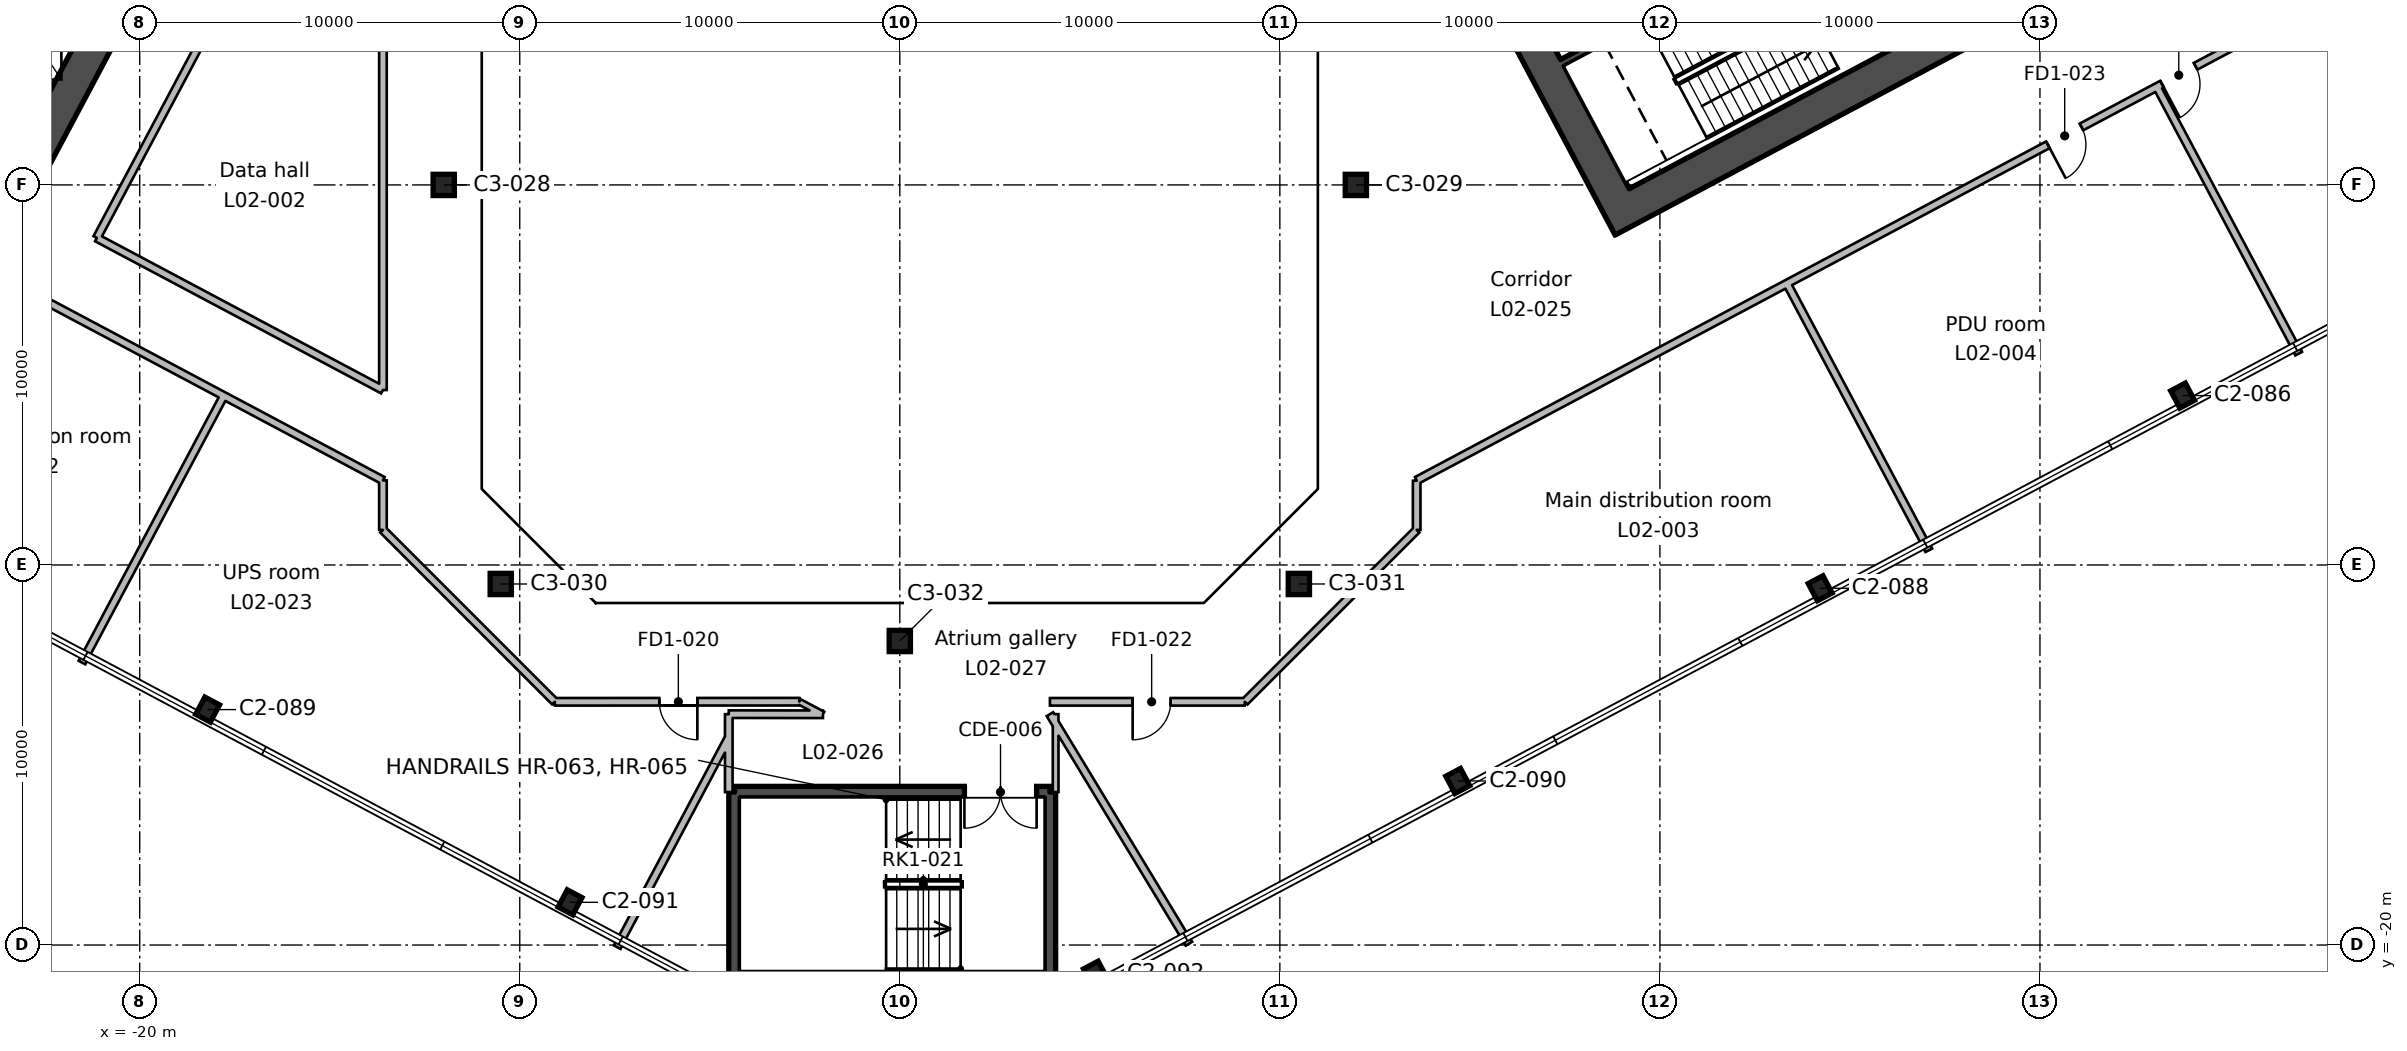
"""IFC4 building model, lengths in metres.
Left out: names, types, materials, properties, quantities, classifications, styles, units other than length and angle.
Written with IfcOpenShell. Run it as: python <this file> out.ifc"""

import sys

from ifc_helpers import new_model, si_unit, direction, frame, frame_2d, origin, origin_2d, place, context, subcontext, project, spatial, rectangle, hollow_rectangle, i_section, extrude, element, fill, save


model = new_model("IFC4")
c1 = context("Model", 3, precision=1e-05, world=origin(), true_north=direction((0.0, 1.0)))
c2 = subcontext(c1, "Body", "Model", "MODEL_VIEW")
j1 = project(units=[si_unit("LENGTHUNIT", "METRE"), si_unit("PLANEANGLEUNIT", "RADIAN")], contexts=[c1])
p1 = place(None, origin())
s1 = spatial("IfcSite", under=j1, at=p1, CompositionType="ELEMENT")
p2 = place(p1, origin())
s2 = spatial("IfcBuilding", under=s1, at=p2, CompositionType="ELEMENT")
p3 = place(p2, frame((0.0, 0.0, 12.2)))
s3 = spatial("IfcBuildingStorey", under=s2, at=p3, CompositionType="ELEMENT", Elevation=12.2)
for number, where, z_axis, x_axis in (
    (1, (5.146, -20.754, 0.0), (0.0, 0.0, 1.0), (0.883, 0.469, 0.0)),
    (2, (-8.677, -18.876, 0.0), (0.0, 0.0, 1.0), (0.883, -0.469, 0.0)),
    (3, (14.681, -15.683, 0.0), (0.0, 0.0, 1.0), (0.883, 0.469, 0.0)),
    (4, (-18.213, -13.805, 0.0), (0.0, 0.0, 1.0), (0.883, -0.469, 0.0)),
):
    element("IfcColumn", number, at=place(p3, frame(where, z_axis=z_axis, x_axis=x_axis)), inside=s3, PredefinedType="COLUMN", context=c2, shape_type="SweptSolid", body=[
        extrude(i_section(OverallWidth=0.437, OverallDepth=0.513, WebThickness=0.061, FlangeThickness=0.097, FilletRadius=0.015, at=origin_2d()), origin(), (0.0, 0.0, 1.0), 5.4),
    ])
p4 = place(p3, frame((0.0, -12.0, 0.0), z_axis=(0.0, 0.0, 1.0), x_axis=(1.0, 0.0, 0.0)))
e5 = element("IfcColumn", 5, at=p4, inside=s3, PredefinedType="COLUMN", context=c2, shape_type="SweptSolid", body=[
    extrude(hollow_rectangle(XDim=0.559, YDim=0.559, WallThickness=0.024, InnerFilletRadius=0.012, OuterFilletRadius=0.035, at=origin_2d()), origin(), (0.0, 0.0, 1.0), 5.4),
])
p5 = place(p3, frame((24.217, -10.613, 0.0), z_axis=(0.0, 0.0, 1.0), x_axis=(0.882947592859, 0.469471562786, 0.0)))
e6 = element("IfcColumn", 6, at=p5, inside=s3, PredefinedType="COLUMN", context=c2, shape_type="SweptSolid", body=[
    extrude(i_section(OverallWidth=0.437, OverallDepth=0.513, WebThickness=0.061, FlangeThickness=0.097, FilletRadius=0.015, at=origin_2d()), origin(), (0.0, 0.0, 1.0), 5.4),
])
for number, where, z_axis, x_axis in (
    (7, (-10.5, -10.5, 0.0), (0.0, 0.0, 1.0), (1.0, 0.0, 0.0)),
    (8, (10.5, -10.5, 0.0), (0.0, 0.0, 1.0), (1.0, 0.0, 0.0)),
):
    element("IfcColumn", number, at=place(p3, frame(where, z_axis=z_axis, x_axis=x_axis)), inside=s3, PredefinedType="COLUMN", context=c2, shape_type="SweptSolid", body=[
        extrude(hollow_rectangle(XDim=0.559, YDim=0.559, WallThickness=0.024, InnerFilletRadius=0.012, OuterFilletRadius=0.035, at=origin_2d()), origin(), (0.0, 0.0, 1.0), 5.4),
    ])
p6 = place(p3, frame((33.753, -5.543, 0.0), z_axis=(0.0, 0.0, 1.0), x_axis=(0.882947592859, 0.469471562786, 0.0)))
e9 = element("IfcColumn", 9, at=p6, inside=s3, PredefinedType="COLUMN", context=c2, shape_type="SweptSolid", body=[
    extrude(i_section(OverallWidth=0.437, OverallDepth=0.513, WebThickness=0.061, FlangeThickness=0.097, FilletRadius=0.015, at=origin_2d()), origin(), (0.0, 0.0, 1.0), 5.4),
])
for number, where, z_axis, x_axis in (
    (10, (-12.0, 0.0, 0.0), (0.0, 0.0, 1.0), (1.0, 0.0, 0.0)),
    (11, (12.0, 0.0, 0.0), (0.0, 0.0, 1.0), (1.0, 0.0, 0.0)),
):
    element("IfcColumn", number, at=place(p3, frame(where, z_axis=z_axis, x_axis=x_axis)), inside=s3, PredefinedType="COLUMN", context=c2, shape_type="SweptSolid", body=[
        extrude(hollow_rectangle(XDim=0.559, YDim=0.559, WallThickness=0.024, InnerFilletRadius=0.012, OuterFilletRadius=0.035, at=origin_2d()), origin(), (0.0, 0.0, 1.0), 5.4),
    ])
p7 = place(p3, frame((-13.362, 18.43, 0.0), z_axis=(0.0, 0.0, 1.0), x_axis=(-0.46947084998, -0.882947971864, 0.0)))
e12 = element("IfcWall", 12, at=p7, inside=s3, PredefinedType="SHEAR", context=c2, shape_type="SweptSolid", body=[
    extrude(rectangle(XDim=20.0, YDim=0.9, at=frame_2d((10.0, 0.0))), origin(), (0.0, 0.0, 1.0), 5.4),
])
p8 = place(p7, frame((7.0, 0.0, 0.0)))
e13 = element("IfcOpeningElement", 13, at=p8, cuts=e12, PredefinedType="OPENING", context=c2, shape_type="SweptSolid", body=[
    extrude(rectangle(XDim=2.4, YDim=2.4, at=frame_2d((1.2, 1.2))), frame((0.0, 0.46, 0.0), z_axis=(0.0, -1.0, 0.0), x_axis=(1.0, 0.0, 0.0)), (0.0, 0.0, 1.0), 0.92),
])
p9 = place(p3, frame((19.219, -1.107, 0.0), z_axis=(0.0, 0.0, 1.0), x_axis=(-0.46947084998, 0.882947971864, 0.0)))
e14 = element("IfcWall", 14, at=p9, inside=s3, PredefinedType="SHEAR", context=c2, shape_type="SweptSolid", body=[
    extrude(rectangle(XDim=20.0, YDim=0.9, at=frame_2d((10.0, 0.0))), origin(), (0.0, 0.0, 1.0), 5.4),
])
p10 = place(p9, frame((7.0, 0.0, 0.0)))
e15 = element("IfcOpeningElement", 15, at=p10, cuts=e14, PredefinedType="OPENING", context=c2, shape_type="SweptSolid", body=[
    extrude(rectangle(XDim=2.4, YDim=2.4, at=frame_2d((1.2, 1.2))), frame((0.0, 0.46, 0.0), z_axis=(0.0, -1.0, 0.0), x_axis=(1.0, 0.0, 0.0)), (0.0, 0.0, 1.0), 0.92),
])
p11 = place(p3, frame((19.405, -0.498, 0.0), z_axis=(0.0, 0.0, 1.0), x_axis=(0.88294509198, 0.469476266226, 0.0)))
e16 = element("IfcWall", 16, at=p11, inside=s3, PredefinedType="SHEAR", context=c2, shape_type="SweptSolid", body=[
    extrude(rectangle(XDim=20.2, YDim=0.9, at=frame_2d((10.1, 0.0))), origin(), (0.0, 0.0, 1.0), 5.4),
])
p12 = place(p3, frame((17.434, 3.21, 0.0), z_axis=(0.0, 0.0, 1.0), x_axis=(0.882940221191, 0.469485426614, 0.0)))
e17 = element("IfcWall", 17, at=p12, inside=s3, PredefinedType="SHEAR", context=c2, shape_type="SweptSolid", body=[
    extrude(rectangle(XDim=8.0, YDim=0.2, at=frame_2d((4.0, 0.0))), origin(), (0.0, 0.0, 1.0), 5.4),
])
p13 = place(p3, frame((3.95, -15.975, 0.0), z_axis=(0.0, 0.0, 1.0), x_axis=(0.0, -1.0, 0.0)))
e18 = element("IfcWall", 18, at=p13, inside=s3, PredefinedType="SHEAR", context=c2, shape_type="SweptSolid", body=[
    extrude(rectangle(XDim=4.85, YDim=0.3, at=frame_2d((2.425, 0.0))), origin(), (0.0, 0.0, 1.0), 5.4),
])
p14 = place(p3, frame((3.95, -20.825, 0.0), z_axis=(0.0, 0.0, 1.0), x_axis=(-1.0, 0.0, 0.0)))
e19 = element("IfcWall", 19, at=p14, inside=s3, PredefinedType="SHEAR", context=c2, shape_type="SweptSolid", body=[
    extrude(rectangle(XDim=8.3, YDim=0.3, at=frame_2d((4.15, 0.0))), origin(), (0.0, 0.0, 1.0), 5.4),
])
p15 = place(p3, frame((-4.35, -20.825, 0.0), z_axis=(0.0, 0.0, 1.0), x_axis=(0.0, 1.0, 0.0)))
e20 = element("IfcWall", 20, at=p15, inside=s3, PredefinedType="SHEAR", context=c2, shape_type="SweptSolid", body=[
    extrude(rectangle(XDim=4.85, YDim=0.3, at=frame_2d((2.425, 0.0))), origin(), (0.0, 0.0, 1.0), 5.4),
])
p16 = place(p3, frame((-4.35, -15.975, 0.0), z_axis=(0.0, 0.0, 1.0), x_axis=(1.0, 0.0, 0.0)))
e21 = element("IfcWall", 21, at=p16, inside=s3, PredefinedType="SHEAR", context=c2, shape_type="SweptSolid", body=[
    extrude(rectangle(XDim=8.3, YDim=0.3, at=frame_2d((4.15, 0.0))), origin(), (0.0, 0.0, 1.0), 5.4),
])
p17 = place(p16, frame((6.05, 0.0, 0.0)))
e22 = element("IfcOpeningElement", 22, at=p17, cuts=e21, PredefinedType="OPENING", context=c2, shape_type="SweptSolid", body=[
    extrude(rectangle(XDim=1.9, YDim=2.1, at=frame_2d((0.95, 1.05))), frame((0.0, 0.16, 0.0), z_axis=(0.0, -1.0, 0.0), x_axis=(1.0, 0.0, 0.0)), (0.0, 0.0, 1.0), 0.32),
])
p18 = place(p3, frame((-13.6, -9.077, 0.0), z_axis=(0.0, 0.0, 1.0), x_axis=(0.0, 1.0, 0.0)))
e23 = element("IfcWall", 23, at=p18, inside=s3, PredefinedType="PARTITIONING", context=c2, shape_type="SweptSolid", body=[
    extrude(rectangle(XDim=1.302, YDim=0.2, at=frame_2d((0.651, 0.0))), origin(), (0.0, 0.0, 1.0), 4.95),
])
p19 = place(p3, frame((-13.6, -7.775, 0.0), z_axis=(0.0, 0.0, 1.0), x_axis=(-0.882943264249, 0.469479703626, 0.0)))
e24 = element("IfcWall", 24, at=p19, inside=s3, PredefinedType="PARTITIONING", context=c2, shape_type="SweptSolid", body=[
    extrude(rectangle(XDim=34.636, YDim=0.2, at=frame_2d((17.318, 0.0))), origin(), (0.0, 0.0, 1.0), 4.95),
])
p20 = place(p19, frame((16.85, 0.0, 0.0)))
e25 = element("IfcOpeningElement", 25, at=p20, cuts=e24, PredefinedType="OPENING", context=c2, shape_type="SweptSolid", body=[
    extrude(rectangle(XDim=1.0, YDim=2.1, at=frame_2d((0.5, 1.05))), frame((0.0, 0.11, 0.0), z_axis=(0.0, -1.0, 0.0), x_axis=(1.0, 0.0, 0.0)), (0.0, 0.0, 1.0), 0.22),
])
p21 = place(p19, frame((14.25, 0.0, 0.0)))
e26 = element("IfcOpeningElement", 26, at=p21, cuts=e24, PredefinedType="OPENING", context=c2, shape_type="SweptSolid", body=[
    extrude(rectangle(XDim=1.0, YDim=2.1, at=frame_2d((0.5, 1.05))), frame((0.0, 0.11, 0.0), z_axis=(0.0, -1.0, 0.0), x_axis=(1.0, 0.0, 0.0)), (0.0, 0.0, 1.0), 0.22),
])
p22 = place(p3, frame((-17.787, -5.549, 0.0), z_axis=(0.0, 0.0, 1.0), x_axis=(-0.469551855795, -0.882904895625, 0.0)))
e27 = element("IfcWall", 27, at=p22, inside=s3, PredefinedType="PARTITIONING", context=c2, shape_type="SweptSolid", body=[
    extrude(rectangle(XDim=7.95, YDim=0.2, at=frame_2d((3.975, 0.0))), origin(), (0.0, 0.0, 1.0), 4.95),
])
p23 = place(p3, frame((-13.6, -9.077, 0.0), z_axis=(0.0, 0.0, 1.0), x_axis=(0.707106781187, -0.707106781187, 0.0)))
e28 = element("IfcWall", 28, at=p23, inside=s3, PredefinedType="PARTITIONING", context=c2, shape_type="SweptSolid", body=[
    extrude(rectangle(XDim=6.397, YDim=0.2, at=frame_2d((3.198, 0.0))), origin(), (0.0, 0.0, 1.0), 4.95),
])
p24 = place(p3, frame((-9.077, -13.6, 0.0), z_axis=(0.0, 0.0, 1.0), x_axis=(0.999999878252, 0.000493452208, 0.0)))
e29 = element("IfcWall", 29, at=p24, inside=s3, PredefinedType="PARTITIONING", context=c2, shape_type="SweptSolid", body=[
    extrude(rectangle(XDim=6.432, YDim=0.2, at=frame_2d((3.216, 0.0))), origin(), (0.0, 0.0, 1.0), 4.95),
])
p25 = place(p24, frame((2.75, 0.0, 0.0)))
e30 = element("IfcOpeningElement", 30, at=p25, cuts=e29, PredefinedType="OPENING", context=c2, shape_type="SweptSolid", body=[
    extrude(rectangle(XDim=1.0, YDim=2.1, at=frame_2d((0.5, 1.05))), frame((0.0, 0.11, 0.0), z_axis=(0.0, -1.0, 0.0), x_axis=(1.0, 0.0, 0.0)), (0.0, 0.0, 1.0), 0.22),
])
p26 = place(p3, frame((-2.645, -13.597, 0.0), z_axis=(0.0, 0.0, 1.0), x_axis=(0.883079874776, -0.469222692083, 0.0)))
e31 = element("IfcWall", 31, at=p26, inside=s3, PredefinedType="PARTITIONING", context=c2, shape_type="SweptSolid", body=[
    extrude(rectangle(XDim=0.706, YDim=0.15, at=frame_2d((0.353, 0.0))), origin(), (0.0, 0.0, 1.0), 4.95),
])
p27 = place(p3, frame((-2.022, -13.928, 0.0), z_axis=(0.0, 0.0, 1.0), x_axis=(-0.999999301124, 0.001182265184, 0.0)))
e32 = element("IfcWall", 32, at=p27, inside=s3, PredefinedType="PARTITIONING", context=c2, shape_type="SweptSolid", body=[
    extrude(rectangle(XDim=2.478, YDim=0.2, at=frame_2d((1.239, 0.0))), origin(), (0.0, 0.0, 1.0), 4.95),
])
p28 = place(p3, frame((-4.5, -13.925, 0.0), z_axis=(0.0, 0.0, 1.0), x_axis=(0.0, -1.0, 0.0)))
e33 = element("IfcWall", 33, at=p28, inside=s3, PredefinedType="PARTITIONING", context=c2, shape_type="SweptSolid", body=[
    extrude(rectangle(XDim=2.05, YDim=0.2, at=frame_2d((1.025, 0.0))), origin(), (0.0, 0.0, 1.0), 4.95),
])
p29 = place(p3, frame((-4.5, -14.533, 0.0), z_axis=(0.0, 0.0, 1.0), x_axis=(-0.469522352041, -0.882920585859, 0.0)))
e34 = element("IfcWall", 34, at=p29, inside=s3, PredefinedType="PARTITIONING", context=c2, shape_type="SweptSolid", body=[
    extrude(rectangle(XDim=6.255, YDim=0.2, at=frame_2d((3.128, 0.0))), origin(), (0.0, 0.0, 1.0), 4.95),
])
p30 = place(p3, frame((4.1, -13.925, 0.0), z_axis=(0.0, 0.0, 1.0), x_axis=(0.0, -1.0, 0.0)))
e35 = element("IfcWall", 35, at=p30, inside=s3, PredefinedType="PARTITIONING", context=c2, shape_type="SweptSolid", body=[
    extrude(rectangle(XDim=2.05, YDim=0.15, at=frame_2d((1.025, 0.0))), origin(), (0.0, 0.0, 1.0), 4.95),
])
p31 = place(p3, frame((13.6, -7.782, 0.0), z_axis=(0.0, 0.0, 1.0), x_axis=(0.0, -1.0, 0.0)))
e36 = element("IfcWall", 36, at=p31, inside=s3, PredefinedType="PARTITIONING", context=c2, shape_type="SweptSolid", body=[
    extrude(rectangle(XDim=1.295, YDim=0.2, at=frame_2d((0.647, 0.0))), origin(), (0.0, 0.0, 1.0), 4.95),
])
p32 = place(p3, frame((13.6, -9.077, 0.0), z_axis=(0.0, 0.0, 1.0), x_axis=(-0.707106781187, -0.707106781187, 0.0)))
e37 = element("IfcWall", 37, at=p32, inside=s3, PredefinedType="PARTITIONING", context=c2, shape_type="SweptSolid", body=[
    extrude(rectangle(XDim=6.397, YDim=0.2, at=frame_2d((3.198, 0.0))), origin(), (0.0, 0.0, 1.0), 4.95),
])
p33 = place(p3, frame((9.077, -13.6, 0.0), z_axis=(0.0, 0.0, 1.0), x_axis=(-1.0, 0.0, 0.0)))
e38 = element("IfcWall", 38, at=p33, inside=s3, PredefinedType="PARTITIONING", context=c2, shape_type="SweptSolid", body=[
    extrude(rectangle(XDim=5.127, YDim=0.2, at=frame_2d((2.563, 0.0))), origin(), (0.0, 0.0, 1.0), 4.95),
])
p34 = place(p33, frame((1.95, 0.0, 0.0)))
e39 = element("IfcOpeningElement", 39, at=p34, cuts=e38, PredefinedType="OPENING", context=c2, shape_type="SweptSolid", body=[
    extrude(rectangle(XDim=1.0, YDim=2.1, at=frame_2d((0.5, 1.05))), frame((0.0, 0.11, 0.0), z_axis=(0.0, -1.0, 0.0), x_axis=(1.0, 0.0, 0.0)), (0.0, 0.0, 1.0), 0.22),
])
p35 = place(p3, frame((7.609, -19.965, 0.0), z_axis=(0.0, 0.0, 1.0), x_axis=(-0.518126246201, 0.855304152333, 0.0)))
e40 = element("IfcWall", 40, at=p35, inside=s3, PredefinedType="PARTITIONING", context=c2, shape_type="SweptSolid", body=[
    extrude(rectangle(XDim=7.062, YDim=0.2, at=frame_2d((3.531, 0.0))), origin(), (0.0, 0.0, 1.0), 4.95),
])
p36 = place(p3, frame((23.344, -2.595, 0.0), z_axis=(0.0, 0.0, 1.0), x_axis=(0.469456091969, -0.882955818664, 0.0)))
e41 = element("IfcWall", 41, at=p36, inside=s3, PredefinedType="PARTITIONING", context=c2, shape_type="SweptSolid", body=[
    extrude(rectangle(XDim=7.949, YDim=0.2, at=frame_2d((3.975, 0.0))), origin(), (0.0, 0.0, 1.0), 4.95),
])
p37 = place(p3, frame((47.736, 10.375, 0.0), z_axis=(0.0, 0.0, 1.0), x_axis=(-0.882953206174, -0.469461005524, 0.0)))
e42 = element("IfcWall", 42, at=p37, inside=s3, PredefinedType="PARTITIONING", context=c2, shape_type="SweptSolid", body=[
    extrude(rectangle(XDim=38.661, YDim=0.2, at=frame_2d((19.331, 0.0))), origin(), (0.0, 0.0, 1.0), 4.95),
])
p38 = place(p37, frame((18.85, 0.0, 0.0)))
e43 = element("IfcOpeningElement", 43, at=p38, cuts=e42, PredefinedType="OPENING", context=c2, shape_type="SweptSolid", body=[
    extrude(rectangle(XDim=1.0, YDim=2.1, at=frame_2d((0.5, 1.05))), frame((0.0, 0.11, 0.0), z_axis=(0.0, -1.0, 0.0), x_axis=(1.0, 0.0, 0.0)), (0.0, 0.0, 1.0), 0.22),
])
p39 = place(p37, frame((15.45, 0.0, 0.0)))
e44 = element("IfcOpeningElement", 44, at=p39, cuts=e42, PredefinedType="OPENING", context=c2, shape_type="SweptSolid", body=[
    extrude(rectangle(XDim=1.0, YDim=2.1, at=frame_2d((0.5, 1.05))), frame((0.0, 0.11, 0.0), z_axis=(0.0, -1.0, 0.0), x_axis=(1.0, 0.0, 0.0)), (0.0, 0.0, 1.0), 0.22),
])
p40 = place(p3, frame((36.809, -4.439, 0.0), z_axis=(0.0, 0.0, 1.0), x_axis=(-0.46942911731, 0.88297016021, 0.0)))
e45 = element("IfcWall", 45, at=p40, inside=s3, PredefinedType="PARTITIONING", context=c2, shape_type="SweptSolid", body=[
    extrude(rectangle(XDim=7.95, YDim=0.2, at=frame_2d((3.975, 0.0))), origin(), (0.0, 0.0, 1.0), 4.95),
])
p41 = place(p3, frame((-21.128, -1.394, 0.0), z_axis=(0.0, 0.0, 1.0), x_axis=(0.46951219964, 0.882925984661, 0.0)))
e46 = element("IfcWall", 46, at=p41, inside=s3, PredefinedType="PARTITIONING", context=c2, shape_type="SweptSolid", body=[
    extrude(rectangle(XDim=22.3, YDim=0.2, at=frame_2d((11.15, 0.0))), origin(), (0.0, 0.0, 1.0), 4.95),
])
p42 = place(p41, frame((10.65, 0.0, 0.0)))
e47 = element("IfcOpeningElement", 47, at=p42, cuts=e46, PredefinedType="OPENING", context=c2, shape_type="SweptSolid", body=[
    extrude(rectangle(XDim=1.0, YDim=2.1, at=frame_2d((0.5, 1.05))), frame((0.0, 0.11, 0.0), z_axis=(0.0, -1.0, 0.0), x_axis=(1.0, 0.0, 0.0)), (0.0, 0.0, 1.0), 0.22),
])
p43 = place(p3, frame((-13.6, 9.077, 0.0), z_axis=(0.0, 0.0, 1.0), x_axis=(0.0, -1.0, 0.0)))
e48 = element("IfcWall", 48, at=p43, inside=s3, PredefinedType="PARTITIONING", context=c2, shape_type="SweptSolid", body=[
    extrude(rectangle(XDim=14.474, YDim=0.2, at=frame_2d((7.237, 0.0))), origin(), (0.0, 0.0, 1.0), 4.95),
])
p44 = place(p3, frame((-13.6, -5.397, 0.0), z_axis=(0.0, 0.0, 1.0), x_axis=(-0.882932501381, 0.469499944627, 0.0)))
e49 = element("IfcWall", 49, at=p44, inside=s3, PredefinedType="PARTITIONING", context=c2, shape_type="SweptSolid", body=[
    extrude(rectangle(XDim=8.526, YDim=0.2, at=frame_2d((4.263, 0.0))), origin(), (0.0, 0.0, 1.0), 4.95),
])
p45 = place(p17, frame((1.9, 0.0, 0.0), z_axis=(0.0, 0.0, 1.0), x_axis=(-1.0, 0.0, 0.0)))
e50 = element("IfcDoor", 50, at=p45, inside=s3, OperationType="DOUBLE_DOOR_SINGLE_SWING", PredefinedType="DOOR", context=c2, shape_type="SweptSolid", body=[
    extrude(rectangle(XDim=1.9, YDim=2.1, at=frame_2d((0.95, 1.05))), frame((0.0, 0.025, 0.0), z_axis=(0.0, -1.0, 0.0), x_axis=(1.0, 0.0, 0.0)), (0.0, 0.0, 1.0), 0.05),
])
fill(e22, e50)
p46 = place(p34, origin())
e51 = element("IfcDoor", 51, at=p46, inside=s3, OperationType="SINGLE_SWING_RIGHT", PredefinedType="DOOR", context=c2, shape_type="SweptSolid", body=[
    extrude(rectangle(XDim=1.0, YDim=2.1, at=frame_2d((0.5, 1.05))), frame((0.0, 0.025, 0.0), z_axis=(0.0, -1.0, 0.0), x_axis=(1.0, 0.0, 0.0)), (0.0, 0.0, 1.0), 0.05),
])
fill(e39, e51)
p47 = place(p38, origin())
e52 = element("IfcDoor", 52, at=p47, inside=s3, OperationType="SINGLE_SWING_RIGHT", PredefinedType="DOOR", context=c2, shape_type="SweptSolid", body=[
    extrude(rectangle(XDim=1.0, YDim=2.1, at=frame_2d((0.5, 1.05))), frame((0.0, 0.025, 0.0), z_axis=(0.0, -1.0, 0.0), x_axis=(1.0, 0.0, 0.0)), (0.0, 0.0, 1.0), 0.05),
])
fill(e43, e52)
p48 = place(p39, origin())
e53 = element("IfcDoor", 53, at=p48, inside=s3, OperationType="SINGLE_SWING_RIGHT", PredefinedType="DOOR", context=c2, shape_type="SweptSolid", body=[
    extrude(rectangle(XDim=1.0, YDim=2.1, at=frame_2d((0.5, 1.05))), frame((0.0, 0.025, 0.0), z_axis=(0.0, -1.0, 0.0), x_axis=(1.0, 0.0, 0.0)), (0.0, 0.0, 1.0), 0.05),
])
fill(e44, e53)
p49 = place(p25, frame((1.0, 0.0, 0.0), z_axis=(0.0, 0.0, 1.0), x_axis=(-1.0, 0.0, 0.0)))
e54 = element("IfcDoor", 54, at=p49, inside=s3, OperationType="SINGLE_SWING_LEFT", PredefinedType="DOOR", context=c2, shape_type="SweptSolid", body=[
    extrude(rectangle(XDim=1.0, YDim=2.1, at=frame_2d((0.5, 1.05))), frame((0.0, 0.025, 0.0), z_axis=(0.0, -1.0, 0.0), x_axis=(1.0, 0.0, 0.0)), (0.0, 0.0, 1.0), 0.05),
])
fill(e30, e54)
save(model, sys.argv[1])
